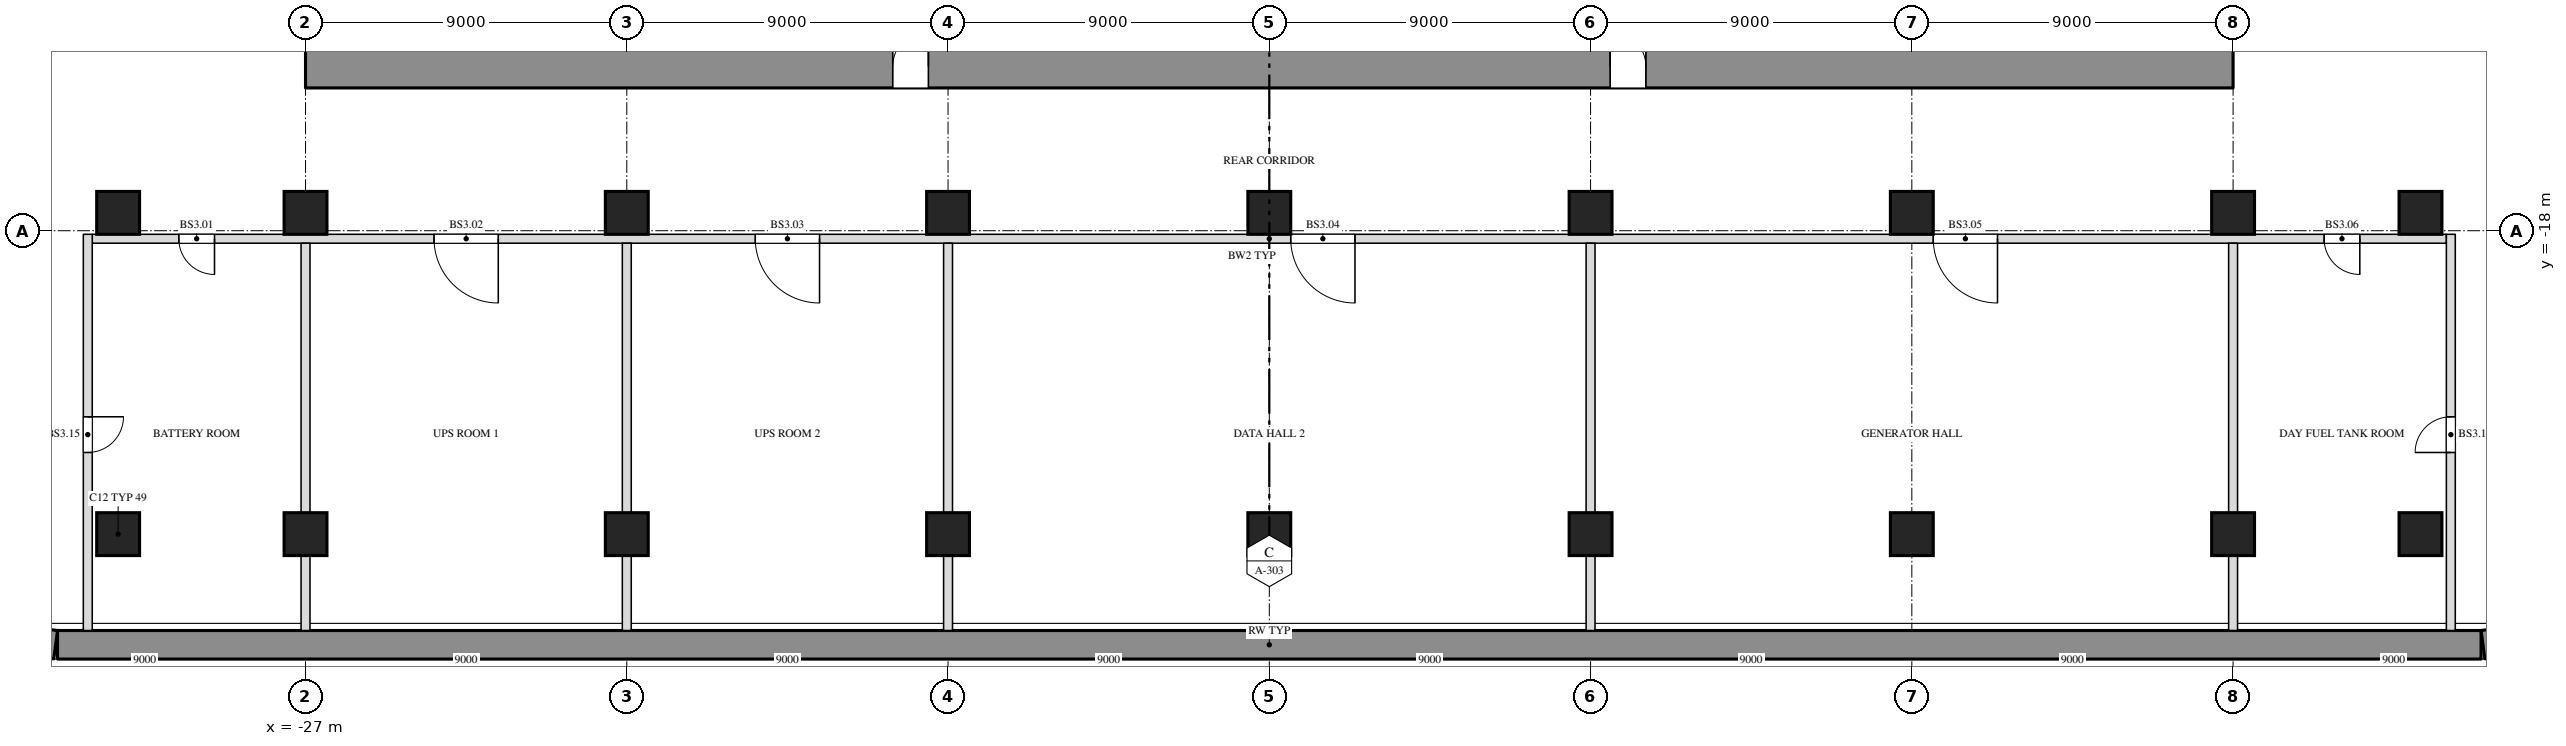
"""IFC4 building model, lengths in metres.
Left out: names, types, materials, properties, quantities, classifications, styles, units other than length and angle.
Written with IfcOpenShell. Run it as: python <this file> out.ifc"""

import sys

from ifc_helpers import new_model, si_unit, direction, frame, frame_2d, origin, origin_2d, place, context, subcontext, project, spatial, rectangle, extrude, element, fill, save


model = new_model("IFC4")
c1 = context("Model", 3, precision=1e-05, world=origin(), true_north=direction((0.0, 1.0)))
c2 = subcontext(c1, "Body", "Model", "MODEL_VIEW")
j1 = project(units=[si_unit("LENGTHUNIT", "METRE"), si_unit("PLANEANGLEUNIT", "RADIAN")], contexts=[c1])
p1 = place(None, origin())
s1 = spatial("IfcSite", under=j1, at=p1, CompositionType="ELEMENT")
p2 = place(p1, origin())
s2 = spatial("IfcBuilding", under=s1, at=p2, CompositionType="ELEMENT")
p3 = place(p2, frame((0.0, 0.0, -12.6)))
s3 = spatial("IfcBuildingStorey", under=s2, at=p3, CompositionType="ELEMENT", Elevation=-12.6)
p4 = place(p3, frame((33.948, -29.6, 0.0), z_axis=(0.0, 0.0, 1.0), x_axis=(-1.0, 0.0, 0.0)))
e1 = element("IfcWall", 1, at=p4, inside=s3, PredefinedType="SOLIDWALL", context=c2, shape_type="SweptSolid", body=[
    extrude(rectangle(XDim=67.895, YDim=0.8, at=frame_2d((33.948, 0.0))), origin(), (0.0, 0.0, 1.0), 4.2),
])
for number, where, z_axis, x_axis in (
    (2, (-34.0, -29.597, 0.0), (0.0, 0.0, 1.0), (-0.991, 0.131, 0.0)),
    (3, (35.396, -29.413, 0.0), (0.0, 0.0, 1.0), (-0.991, -0.131, 0.0)),
):
    element("IfcWall", number, at=place(p3, frame(where, z_axis=z_axis, x_axis=x_axis)), inside=s3, PredefinedType="SOLIDWALL", context=c2, shape_type="SweptSolid", body=[
        extrude(rectangle(XDim=1.408, YDim=0.8, at=frame_2d((0.704, 0.0))), origin(), (0.0, 0.0, 1.0), 4.2),
    ])
for number, where, z_axis, x_axis in (
    (4, (-32.25, -26.5, 0.0), (0.0, 0.0, 1.0), (1.0, 0.0, 0.0)),
    (5, (-27.0, -26.5, 0.0), (0.0, 0.0, 1.0), (1.0, 0.0, 0.0)),
    (6, (-18.0, -26.5, 0.0), (0.0, 0.0, 1.0), (1.0, 0.0, 0.0)),
    (7, (-9.0, -26.5, 0.0), (0.0, 0.0, 1.0), (1.0, 0.0, 0.0)),
    (8, (0.0, -26.5, 0.0), (0.0, 0.0, 1.0), (1.0, 0.0, 0.0)),
    (9, (9.0, -26.5, 0.0), (0.0, 0.0, 1.0), (1.0, 0.0, 0.0)),
    (10, (18.0, -26.5, 0.0), (0.0, 0.0, 1.0), (1.0, 0.0, 0.0)),
    (11, (27.0, -26.5, 0.0), (0.0, 0.0, 1.0), (1.0, 0.0, 0.0)),
    (12, (32.25, -26.5, 0.0), (0.0, 0.0, 1.0), (1.0, 0.0, 0.0)),
    (13, (-32.25, -17.5, 0.0), (0.0, 0.0, 1.0), (1.0, 0.0, 0.0)),
    (14, (-27.0, -17.5, 0.0), (0.0, 0.0, 1.0), (1.0, 0.0, 0.0)),
    (15, (-18.0, -17.5, 0.0), (0.0, 0.0, 1.0), (1.0, 0.0, 0.0)),
    (16, (-9.0, -17.5, 0.0), (0.0, 0.0, 1.0), (1.0, 0.0, 0.0)),
    (17, (0.0, -17.5, 0.0), (0.0, 0.0, 1.0), (1.0, 0.0, 0.0)),
    (18, (9.0, -17.5, 0.0), (0.0, 0.0, 1.0), (1.0, 0.0, 0.0)),
    (19, (18.0, -17.5, 0.0), (0.0, 0.0, 1.0), (1.0, 0.0, 0.0)),
    (20, (27.0, -17.5, 0.0), (0.0, 0.0, 1.0), (1.0, 0.0, 0.0)),
    (21, (32.25, -17.5, 0.0), (0.0, 0.0, 1.0), (1.0, 0.0, 0.0)),
):
    element("IfcColumn", number, at=place(p3, frame(where, z_axis=z_axis, x_axis=x_axis)), inside=s3, PredefinedType="COLUMN", context=c2, shape_type="SweptSolid", body=[
        extrude(rectangle(XDim=1.2, YDim=1.2, at=origin_2d()), origin(), (0.0, 0.0, 1.0), 4.2),
    ])
p5 = place(p3, frame((-27.0, -13.4, 0.0), z_axis=(0.0, 0.0, 1.0), x_axis=(1.0, 0.0, 0.0)))
e22 = element("IfcWall", 22, at=p5, inside=s3, PredefinedType="SHEAR", context=c2, shape_type="SweptSolid", body=[
    extrude(rectangle(XDim=54.0, YDim=1.2, at=frame_2d((27.0, 0.0))), origin(), (0.0, 0.0, 1.0), 3.9),
])
p6 = place(p5, frame((16.45, 0.0, 0.0)))
e23 = element("IfcOpeningElement", 23, at=p6, cuts=e22, PredefinedType="OPENING", context=c2, shape_type="SweptSolid", body=[
    extrude(rectangle(XDim=1.0, YDim=2.1, at=frame_2d((0.5, 1.05))), frame((0.0, 0.612, 0.0), z_axis=(0.0, -1.0, 0.0), x_axis=(1.0, 0.0, 0.0)), (0.0, 0.0, 1.0), 1.224),
])
p7 = place(p5, frame((36.55, 0.0, 0.0)))
e24 = element("IfcOpeningElement", 24, at=p7, cuts=e22, PredefinedType="OPENING", context=c2, shape_type="SweptSolid", body=[
    extrude(rectangle(XDim=1.0, YDim=2.1, at=frame_2d((0.5, 1.05))), frame((0.0, 0.612, 0.0), z_axis=(0.0, -1.0, 0.0), x_axis=(1.0, 0.0, 0.0)), (0.0, 0.0, 1.0), 1.224),
])
p8 = place(p3, frame((-32.975, -18.225, 0.0), z_axis=(0.0, 0.0, 1.0), x_axis=(1.0, 0.0, 0.0)))
e25 = element("IfcWall", 25, at=p8, inside=s3, PredefinedType="SOLIDWALL", context=c2, shape_type="SweptSolid", body=[
    extrude(rectangle(XDim=65.95, YDim=0.25, at=frame_2d((32.975, 0.0))), origin(), (0.0, 0.0, 1.0), 3.9),
])
p9 = place(p8, frame((2.425, 0.0, 0.0)))
e26 = element("IfcOpeningElement", 26, at=p9, cuts=e25, PredefinedType="OPENING", context=c2, shape_type="SweptSolid", body=[
    extrude(rectangle(XDim=1.0, YDim=2.1, at=frame_2d((0.5, 1.05))), frame((0.0, 0.137, 0.0), z_axis=(0.0, -1.0, 0.0), x_axis=(1.0, 0.0, 0.0)), (0.0, 0.0, 1.0), 0.274),
])
p10 = place(p8, frame((9.575, 0.0, 0.0)))
e27 = element("IfcOpeningElement", 27, at=p10, cuts=e25, PredefinedType="OPENING", context=c2, shape_type="SweptSolid", body=[
    extrude(rectangle(XDim=1.8, YDim=2.1, at=frame_2d((0.9, 1.05))), frame((0.0, 0.137, 0.0), z_axis=(0.0, -1.0, 0.0), x_axis=(1.0, 0.0, 0.0)), (0.0, 0.0, 1.0), 0.274),
])
p11 = place(p8, frame((18.575, 0.0, 0.0)))
e28 = element("IfcOpeningElement", 28, at=p11, cuts=e25, PredefinedType="OPENING", context=c2, shape_type="SweptSolid", body=[
    extrude(rectangle(XDim=1.8, YDim=2.1, at=frame_2d((0.9, 1.05))), frame((0.0, 0.137, 0.0), z_axis=(0.0, -1.0, 0.0), x_axis=(1.0, 0.0, 0.0)), (0.0, 0.0, 1.0), 0.274),
])
p12 = place(p8, frame((33.575, 0.0, 0.0)))
e29 = element("IfcOpeningElement", 29, at=p12, cuts=e25, PredefinedType="OPENING", context=c2, shape_type="SweptSolid", body=[
    extrude(rectangle(XDim=1.8, YDim=2.1, at=frame_2d((0.9, 1.05))), frame((0.0, 0.137, 0.0), z_axis=(0.0, -1.0, 0.0), x_axis=(1.0, 0.0, 0.0)), (0.0, 0.0, 1.0), 0.274),
])
p13 = place(p8, frame((51.575, 0.0, 0.0)))
e30 = element("IfcOpeningElement", 30, at=p13, cuts=e25, PredefinedType="OPENING", context=c2, shape_type="SweptSolid", body=[
    extrude(rectangle(XDim=1.8, YDim=2.1, at=frame_2d((0.9, 1.05))), frame((0.0, 0.137, 0.0), z_axis=(0.0, -1.0, 0.0), x_axis=(1.0, 0.0, 0.0)), (0.0, 0.0, 1.0), 0.274),
])
p14 = place(p8, frame((62.525, 0.0, 0.0)))
e31 = element("IfcOpeningElement", 31, at=p14, cuts=e25, PredefinedType="OPENING", context=c2, shape_type="SweptSolid", body=[
    extrude(rectangle(XDim=1.0, YDim=2.1, at=frame_2d((0.5, 1.05))), frame((0.0, 0.137, 0.0), z_axis=(0.0, -1.0, 0.0), x_axis=(1.0, 0.0, 0.0)), (0.0, 0.0, 1.0), 0.274),
])
p15 = place(p3, frame((-33.1, -29.2, 0.0), z_axis=(0.0, 0.0, 1.0), x_axis=(0.0, 1.0, 0.0)))
e32 = element("IfcWall", 32, at=p15, inside=s3, PredefinedType="SOLIDWALL", context=c2, shape_type="SweptSolid", body=[
    extrude(rectangle(XDim=11.1, YDim=0.25, at=frame_2d((5.55, 0.0))), origin(), (0.0, 0.0, 1.0), 3.9),
])
p16 = place(p15, frame((4.988, 0.0, 0.0)))
e33 = element("IfcOpeningElement", 33, at=p16, cuts=e32, PredefinedType="OPENING", context=c2, shape_type="SweptSolid", body=[
    extrude(rectangle(XDim=1.0, YDim=2.1, at=frame_2d((0.5, 1.05))), frame((0.0, 0.137, 0.0), z_axis=(0.0, -1.0, 0.0), x_axis=(1.0, 0.0, 0.0)), (0.0, 0.0, 1.0), 0.274),
])
p17 = place(p3, frame((-27.0, -29.2, 0.0), z_axis=(0.0, 0.0, 1.0), x_axis=(0.0, 1.0, 0.0)))
e34 = element("IfcWall", 34, at=p17, inside=s3, PredefinedType="SOLIDWALL", context=c2, shape_type="SweptSolid", body=[
    extrude(rectangle(XDim=2.1, YDim=0.25, at=frame_2d((1.05, 0.0))), origin(), (0.0, 0.0, 1.0), 3.9),
])
p18 = place(p3, frame((-27.0, -25.9, 0.0), z_axis=(0.0, 0.0, 1.0), x_axis=(0.0, 1.0, 0.0)))
e35 = element("IfcWall", 35, at=p18, inside=s3, PredefinedType="SOLIDWALL", context=c2, shape_type="SweptSolid", body=[
    extrude(rectangle(XDim=7.55, YDim=0.25, at=frame_2d((3.775, 0.0))), origin(), (0.0, 0.0, 1.0), 3.9),
])
p19 = place(p3, frame((-18.0, -29.2, 0.0), z_axis=(0.0, 0.0, 1.0), x_axis=(0.0, 1.0, 0.0)))
e36 = element("IfcWall", 36, at=p19, inside=s3, PredefinedType="SOLIDWALL", context=c2, shape_type="SweptSolid", body=[
    extrude(rectangle(XDim=2.1, YDim=0.25, at=frame_2d((1.05, 0.0))), origin(), (0.0, 0.0, 1.0), 3.9),
])
p20 = place(p3, frame((-18.0, -25.9, 0.0), z_axis=(0.0, 0.0, 1.0), x_axis=(0.0, 1.0, 0.0)))
e37 = element("IfcWall", 37, at=p20, inside=s3, PredefinedType="SOLIDWALL", context=c2, shape_type="SweptSolid", body=[
    extrude(rectangle(XDim=7.55, YDim=0.25, at=frame_2d((3.775, 0.0))), origin(), (0.0, 0.0, 1.0), 3.9),
])
p21 = place(p3, frame((-9.0, -29.2, 0.0), z_axis=(0.0, 0.0, 1.0), x_axis=(0.0, 1.0, 0.0)))
e38 = element("IfcWall", 38, at=p21, inside=s3, PredefinedType="SOLIDWALL", context=c2, shape_type="SweptSolid", body=[
    extrude(rectangle(XDim=2.1, YDim=0.25, at=frame_2d((1.05, 0.0))), origin(), (0.0, 0.0, 1.0), 3.9),
])
p22 = place(p3, frame((-9.0, -25.9, 0.0), z_axis=(0.0, 0.0, 1.0), x_axis=(0.0, 1.0, 0.0)))
e39 = element("IfcWall", 39, at=p22, inside=s3, PredefinedType="SOLIDWALL", context=c2, shape_type="SweptSolid", body=[
    extrude(rectangle(XDim=7.55, YDim=0.25, at=frame_2d((3.775, 0.0))), origin(), (0.0, 0.0, 1.0), 3.9),
])
p23 = place(p3, frame((9.0, -29.2, 0.0), z_axis=(0.0, 0.0, 1.0), x_axis=(0.0, 1.0, 0.0)))
e40 = element("IfcWall", 40, at=p23, inside=s3, PredefinedType="SOLIDWALL", context=c2, shape_type="SweptSolid", body=[
    extrude(rectangle(XDim=2.1, YDim=0.25, at=frame_2d((1.05, 0.0))), origin(), (0.0, 0.0, 1.0), 3.9),
])
p24 = place(p3, frame((9.0, -25.9, 0.0), z_axis=(0.0, 0.0, 1.0), x_axis=(0.0, 1.0, 0.0)))
e41 = element("IfcWall", 41, at=p24, inside=s3, PredefinedType="SOLIDWALL", context=c2, shape_type="SweptSolid", body=[
    extrude(rectangle(XDim=7.55, YDim=0.25, at=frame_2d((3.775, 0.0))), origin(), (0.0, 0.0, 1.0), 3.9),
])
p25 = place(p3, frame((27.0, -29.2, 0.0), z_axis=(0.0, 0.0, 1.0), x_axis=(0.0, 1.0, 0.0)))
e42 = element("IfcWall", 42, at=p25, inside=s3, PredefinedType="SOLIDWALL", context=c2, shape_type="SweptSolid", body=[
    extrude(rectangle(XDim=2.1, YDim=0.25, at=frame_2d((1.05, 0.0))), origin(), (0.0, 0.0, 1.0), 3.9),
])
p26 = place(p3, frame((27.0, -25.9, 0.0), z_axis=(0.0, 0.0, 1.0), x_axis=(0.0, 1.0, 0.0)))
e43 = element("IfcWall", 43, at=p26, inside=s3, PredefinedType="SOLIDWALL", context=c2, shape_type="SweptSolid", body=[
    extrude(rectangle(XDim=7.55, YDim=0.25, at=frame_2d((3.775, 0.0))), origin(), (0.0, 0.0, 1.0), 3.9),
])
p27 = place(p3, frame((33.1, -29.2, 0.0), z_axis=(0.0, 0.0, 1.0), x_axis=(0.0, 1.0, 0.0)))
e44 = element("IfcWall", 44, at=p27, inside=s3, PredefinedType="SOLIDWALL", context=c2, shape_type="SweptSolid", body=[
    extrude(rectangle(XDim=11.1, YDim=0.25, at=frame_2d((5.55, 0.0))), origin(), (0.0, 0.0, 1.0), 3.9),
])
p28 = place(p27, frame((4.988, 0.0, 0.0)))
e45 = element("IfcOpeningElement", 45, at=p28, cuts=e44, PredefinedType="OPENING", context=c2, shape_type="SweptSolid", body=[
    extrude(rectangle(XDim=1.0, YDim=2.1, at=frame_2d((0.5, 1.05))), frame((0.0, 0.137, 0.0), z_axis=(0.0, -1.0, 0.0), x_axis=(1.0, 0.0, 0.0)), (0.0, 0.0, 1.0), 0.274),
])
p29 = place(p9, origin())
e46 = element("IfcDoor", 46, at=p29, inside=s3, OperationType="SINGLE_SWING_LEFT", PredefinedType="DOOR", context=c2, shape_type="SweptSolid", body=[
    extrude(rectangle(XDim=1.0, YDim=2.1, at=frame_2d((0.5, 1.05))), frame((0.0, 0.025, 0.0), z_axis=(0.0, -1.0, 0.0), x_axis=(1.0, 0.0, 0.0)), (0.0, 0.0, 1.0), 0.05),
])
fill(e26, e46)
p30 = place(p10, origin())
e47 = element("IfcDoor", 47, at=p30, inside=s3, OperationType="DOUBLE_DOOR_SINGLE_SWING", PredefinedType="DOOR", context=c2, shape_type="SweptSolid", body=[
    extrude(rectangle(XDim=1.8, YDim=2.1, at=frame_2d((0.9, 1.05))), frame((0.0, 0.025, 0.0), z_axis=(0.0, -1.0, 0.0), x_axis=(1.0, 0.0, 0.0)), (0.0, 0.0, 1.0), 0.05),
])
fill(e27, e47)
p31 = place(p11, origin())
e48 = element("IfcDoor", 48, at=p31, inside=s3, OperationType="DOUBLE_DOOR_SINGLE_SWING", PredefinedType="DOOR", context=c2, shape_type="SweptSolid", body=[
    extrude(rectangle(XDim=1.8, YDim=2.1, at=frame_2d((0.9, 1.05))), frame((0.0, 0.025, 0.0), z_axis=(0.0, -1.0, 0.0), x_axis=(1.0, 0.0, 0.0)), (0.0, 0.0, 1.0), 0.05),
])
fill(e28, e48)
p32 = place(p12, origin())
e49 = element("IfcDoor", 49, at=p32, inside=s3, OperationType="DOUBLE_DOOR_SINGLE_SWING", PredefinedType="DOOR", context=c2, shape_type="SweptSolid", body=[
    extrude(rectangle(XDim=1.8, YDim=2.1, at=frame_2d((0.9, 1.05))), frame((0.0, 0.025, 0.0), z_axis=(0.0, -1.0, 0.0), x_axis=(1.0, 0.0, 0.0)), (0.0, 0.0, 1.0), 0.05),
])
fill(e29, e49)
p33 = place(p13, origin())
e50 = element("IfcDoor", 50, at=p33, inside=s3, OperationType="DOUBLE_DOOR_SINGLE_SWING", PredefinedType="DOOR", context=c2, shape_type="SweptSolid", body=[
    extrude(rectangle(XDim=1.8, YDim=2.1, at=frame_2d((0.9, 1.05))), frame((0.0, 0.025, 0.0), z_axis=(0.0, -1.0, 0.0), x_axis=(1.0, 0.0, 0.0)), (0.0, 0.0, 1.0), 0.05),
])
fill(e30, e50)
p34 = place(p14, origin())
e51 = element("IfcDoor", 51, at=p34, inside=s3, OperationType="SINGLE_SWING_LEFT", PredefinedType="DOOR", context=c2, shape_type="SweptSolid", body=[
    extrude(rectangle(XDim=1.0, YDim=2.1, at=frame_2d((0.5, 1.05))), frame((0.0, 0.025, 0.0), z_axis=(0.0, -1.0, 0.0), x_axis=(1.0, 0.0, 0.0)), (0.0, 0.0, 1.0), 0.05),
])
fill(e31, e51)
p35 = place(p16, origin())
e52 = element("IfcDoor", 52, at=p35, inside=s3, OperationType="SINGLE_SWING_LEFT", PredefinedType="DOOR", context=c2, shape_type="SweptSolid", body=[
    extrude(rectangle(XDim=1.0, YDim=2.1, at=frame_2d((0.5, 1.05))), frame((0.0, 0.025, 0.0), z_axis=(0.0, -1.0, 0.0), x_axis=(1.0, 0.0, 0.0)), (0.0, 0.0, 1.0), 0.05),
])
fill(e33, e52)
p36 = place(p28, origin())
e53 = element("IfcDoor", 53, at=p36, inside=s3, OperationType="SINGLE_SWING_LEFT", PredefinedType="DOOR", context=c2, shape_type="SweptSolid", body=[
    extrude(rectangle(XDim=1.0, YDim=2.1, at=frame_2d((0.5, 1.05))), frame((0.0, 0.025, 0.0), z_axis=(0.0, -1.0, 0.0), x_axis=(1.0, 0.0, 0.0)), (0.0, 0.0, 1.0), 0.05),
])
fill(e45, e53)
p37 = place(p6, origin())
e54 = element("IfcDoor", 54, at=p37, inside=s3, OperationType="SINGLE_SWING_RIGHT", PredefinedType="DOOR", context=c2, shape_type="SweptSolid", body=[
    extrude(rectangle(XDim=1.0, YDim=2.1, at=frame_2d((0.5, 1.05))), frame((0.0, 0.025, 0.0), z_axis=(0.0, -1.0, 0.0), x_axis=(1.0, 0.0, 0.0)), (0.0, 0.0, 1.0), 0.05),
])
fill(e23, e54)
p38 = place(p7, origin())
e55 = element("IfcDoor", 55, at=p38, inside=s3, OperationType="SINGLE_SWING_LEFT", PredefinedType="DOOR", context=c2, shape_type="SweptSolid", body=[
    extrude(rectangle(XDim=1.0, YDim=2.1, at=frame_2d((0.5, 1.05))), frame((0.0, 0.025, 0.0), z_axis=(0.0, -1.0, 0.0), x_axis=(1.0, 0.0, 0.0)), (0.0, 0.0, 1.0), 0.05),
])
fill(e24, e55)
save(model, sys.argv[1])
